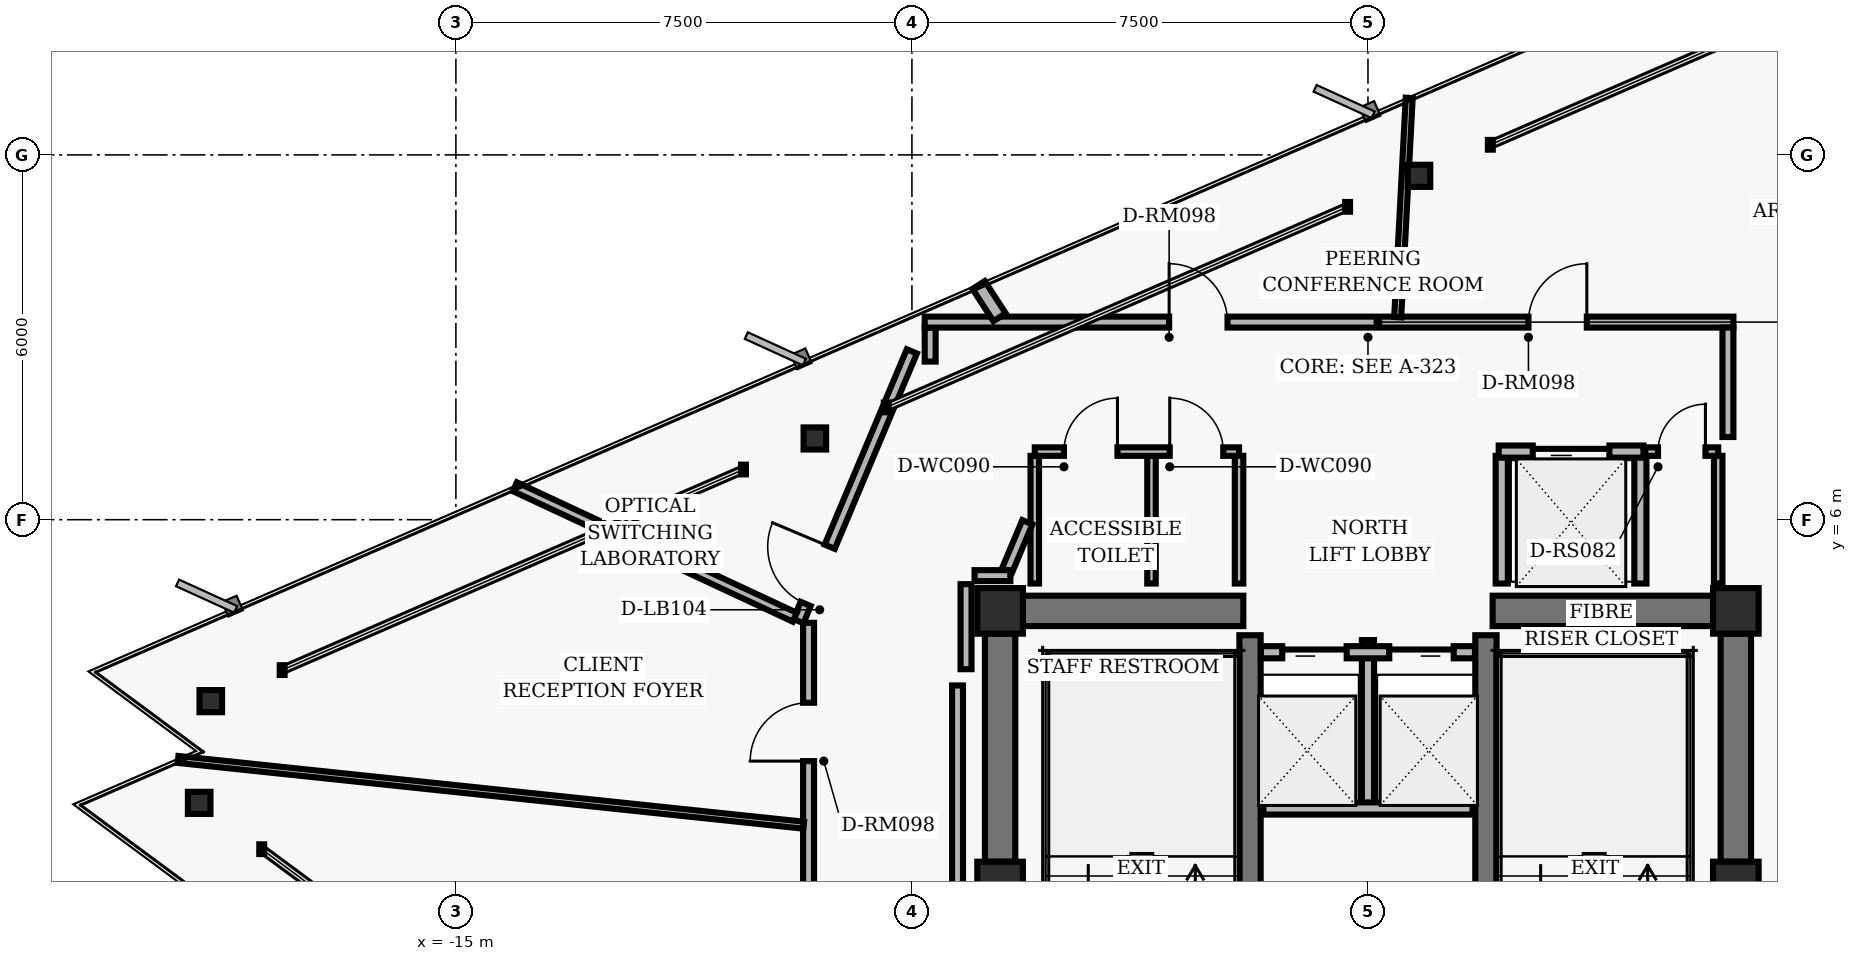
"""IFC4 building model, lengths in metres.
Left out: names, types, materials, properties, quantities, classifications, styles, units other than length and angle.
Written with IfcOpenShell. Run it as: python <this file> out.ifc"""

import sys

from ifc_helpers import new_model, si_unit, direction, frame, frame_2d, origin, origin_2d, place, context, subcontext, project, spatial, rectangle, hollow_rectangle, i_section, extrude, element, fill, save


model = new_model("IFC4")
c1 = context("Model", 3, precision=1e-05, world=origin(), true_north=direction((0.0, 1.0)))
c2 = subcontext(c1, "Body", "Model", "MODEL_VIEW")
j1 = project(units=[si_unit("LENGTHUNIT", "METRE"), si_unit("PLANEANGLEUNIT", "RADIAN")], contexts=[c1])
p1 = place(None, origin())
s1 = spatial("IfcSite", under=j1, at=p1, CompositionType="ELEMENT")
p2 = place(p1, origin())
s2 = spatial("IfcBuilding", under=s1, at=p2, CompositionType="ELEMENT")
p3 = place(p2, frame((0.0, 0.0, 227.04)))
s3 = spatial("IfcBuildingStorey", under=s2, at=p3, CompositionType="ELEMENT", Elevation=227.04)
for number, where, z_axis, x_axis in (
    (1, (-6.05, 4.5, 0.0), (0.0, 0.0, 1.0), (1.0, 0.0, 0.0)),
    (2, (6.05, 4.5, 0.0), (0.0, 0.0, 1.0), (1.0, 0.0, 0.0)),
    (3, (-6.05, 0.0, 0.0), (0.0, 0.0, 1.0), (1.0, 0.0, 0.0)),
    (4, (6.05, 0.0, 0.0), (0.0, 0.0, 1.0), (1.0, 0.0, 0.0)),
):
    element("IfcColumn", number, at=place(p3, frame(where, z_axis=z_axis, x_axis=x_axis)), inside=s3, PredefinedType="COLUMN", context=c2, shape_type="SweptSolid", body=[
        extrude(hollow_rectangle(XDim=0.75, YDim=0.75, WallThickness=0.05, InnerFilletRadius=0.02, OuterFilletRadius=0.04, at=origin_2d()), origin(), (0.0, 0.0, 1.0), 3.04),
    ])
for number, where, z_axis, x_axis in (
    (5, (-6.05, 0.375, 0.0), (0.0, 0.0, 1.0), (0.0, 1.0, 0.0)),
    (6, (6.05, 0.375, 0.0), (0.0, 0.0, 1.0), (0.0, 1.0, 0.0)),
):
    element("IfcWall", number, at=place(p3, frame(where, z_axis=z_axis, x_axis=x_axis)), inside=s3, PredefinedType="SHEAR", context=c2, shape_type="SweptSolid", body=[
        extrude(rectangle(XDim=3.75, YDim=0.5, at=frame_2d((1.875, 0.0))), origin(), (0.0, 0.0, 1.0), 2.798),
    ])
for number, where, z_axis, x_axis in (
    (7, (-1.94, -4.1, 0.0), (0.0, 0.0, 1.0), (0.0, 1.0, 0.0)),
    (8, (1.94, -4.1, 0.0), (0.0, 0.0, 1.0), (0.0, 1.0, 0.0)),
):
    element("IfcWall", number, at=place(p3, frame(where, z_axis=z_axis, x_axis=x_axis)), inside=s3, PredefinedType="SHEAR", context=c2, shape_type="SweptSolid", body=[
        extrude(rectangle(XDim=8.2, YDim=0.35, at=frame_2d((4.1, 0.0))), origin(), (0.0, 0.0, 1.0), 2.798),
    ])
for number, where, z_axis, x_axis in (
    (9, (-5.675, 4.5, 0.0), (0.0, 0.0, 1.0), (1.0, 0.0, 0.0)),
    (10, (2.05, 4.5, 0.0), (0.0, 0.0, 1.0), (1.0, 0.0, 0.0)),
):
    element("IfcWall", number, at=place(p3, frame(where, z_axis=z_axis, x_axis=x_axis)), inside=s3, PredefinedType="SHEAR", context=c2, shape_type="SweptSolid", body=[
        extrude(rectangle(XDim=3.625, YDim=0.5, at=frame_2d((1.812, 0.0))), origin(), (0.0, 0.0, 1.0), 2.798),
    ])
for number, where, z_axis, x_axis in (
    (11, (0.838, 11.656, 0.0), (0.0, 0.0, 1.0), (1.0, 0.0, 0.0)),
    (12, (-9.096, 7.336, 0.0), (0.0, 0.0, 1.0), (1.0, 0.0, 0.0)),
    (13, (-19.031, 3.016, 0.0), (0.0, 0.0, 1.0), (1.0, 0.0, 0.0)),
    (14, (-19.222, 1.342, 0.0), (0.0, 0.0, 1.0), (1.0, 0.0, 0.0)),
):
    element("IfcColumn", number, at=place(p3, frame(where, z_axis=z_axis, x_axis=x_axis)), inside=s3, PredefinedType="COLUMN", context=c2, shape_type="SweptSolid", body=[
        extrude(i_section(OverallWidth=0.371, OverallDepth=0.364, WebThickness=0.013, FlangeThickness=0.022, FilletRadius=0.015, at=origin_2d()), origin(), (0.0, 0.0, 1.0), 3.04),
    ])
p4 = place(p3, frame((0.0, 1.25, 0.0), z_axis=(0.0, 0.0, 1.0), x_axis=(0.0, 1.0, 0.0)))
e15 = element("IfcWall", 15, at=p4, inside=s3, PredefinedType="PARTITIONING", context=c2, shape_type="SweptSolid", body=[
    extrude(rectangle(XDim=2.77, YDim=0.2, at=frame_2d((1.385, 0.0))), origin(), (0.0, 0.0, 1.0), 2.773),
])
p5 = place(p3, frame((-1.72, 1.25, 0.0), z_axis=(0.0, 0.0, 1.0), x_axis=(1.0, 0.0, 0.0)))
e16 = element("IfcWall", 16, at=p5, inside=s3, PredefinedType="PARTITIONING", context=c2, shape_type="SweptSolid", body=[
    extrude(rectangle(XDim=3.44, YDim=0.2, at=frame_2d((1.72, 0.0))), origin(), (0.0, 0.0, 1.0), 2.773),
])
p6 = place(p3, frame((-1.76, 3.82, 0.0), z_axis=(0.0, 0.0, 1.0), x_axis=(1.0, 0.0, 0.0)))
e17 = element("IfcWall", 17, at=p6, inside=s3, PredefinedType="PARTITIONING", context=c2, shape_type="SweptSolid", body=[
    extrude(rectangle(XDim=3.52, YDim=0.2, at=frame_2d((1.76, 0.0))), origin(), (0.0, 0.0, 1.0), 2.773),
])
p7 = place(p6, frame((0.35, 0.0, 0.0)))
e18 = element("IfcOpeningElement", 18, at=p7, cuts=e17, PredefinedType="OPENING", context=c2, shape_type="SweptSolid", body=[
    extrude(rectangle(XDim=1.06, YDim=2.04, at=frame_2d((0.53, 1.02))), frame((0.0, 0.11, 0.0), z_axis=(0.0, -1.0, 0.0), x_axis=(1.0, 0.0, 0.0)), (0.0, 0.0, 1.0), 0.22),
])
p8 = place(p6, frame((2.11, 0.0, 0.0)))
e19 = element("IfcOpeningElement", 19, at=p8, cuts=e17, PredefinedType="OPENING", context=c2, shape_type="SweptSolid", body=[
    extrude(rectangle(XDim=1.06, YDim=2.04, at=frame_2d((0.53, 1.02))), frame((0.0, 0.11, 0.0), z_axis=(0.0, -1.0, 0.0), x_axis=(1.0, 0.0, 0.0)), (0.0, 0.0, 1.0), 0.22),
])
for number, where, z_axis, x_axis in (
    (20, (2.2, 4.95, 0.0), (0.0, 0.0, 1.0), (0.0, 1.0, 0.0)),
    (21, (4.48, 4.95, 0.0), (0.0, 0.0, 1.0), (0.0, 1.0, 0.0)),
):
    element("IfcWall", number, at=place(p3, frame(where, z_axis=z_axis, x_axis=x_axis)), inside=s3, PredefinedType="PARTITIONING", context=c2, shape_type="SweptSolid", body=[
        extrude(rectangle(XDim=2.1, YDim=0.2, at=frame_2d((1.05, 0.0))), origin(), (0.0, 0.0, 1.0), 2.773),
    ])
p9 = place(p3, frame((2.15, 7.12, 0.0), z_axis=(0.0, 0.0, 1.0), x_axis=(1.0, 0.0, 0.0)))
e22 = element("IfcWall", 22, at=p9, inside=s3, PredefinedType="PARTITIONING", context=c2, shape_type="SweptSolid", body=[
    extrude(rectangle(XDim=2.38, YDim=0.2, at=frame_2d((1.19, 0.0))), origin(), (0.0, 0.0, 1.0), 2.395),
])
p10 = place(p9, frame((0.56, 0.0, 0.0)))
e23 = element("IfcOpeningElement", 23, at=p10, cuts=e22, PredefinedType="OPENING", context=c2, shape_type="SweptSolid", body=[
    extrude(rectangle(XDim=1.26, YDim=2.06, at=frame_2d((0.63, 1.03))), frame((0.0, 0.11, 0.0), z_axis=(0.0, -1.0, 0.0), x_axis=(1.0, 0.0, 0.0)), (0.0, 0.0, 1.0), 0.22),
])
for number, where, z_axis, x_axis in (
    (24, (-5.48, 4.95, 0.0), (0.0, 0.0, 1.0), (0.0, 1.0, 0.0)),
    (25, (-3.56, 4.95, 0.0), (0.0, 0.0, 1.0), (0.0, 1.0, 0.0)),
    (26, (-2.12, 4.95, 0.0), (0.0, 0.0, 1.0), (0.0, 1.0, 0.0)),
):
    element("IfcWall", number, at=place(p3, frame(where, z_axis=z_axis, x_axis=x_axis)), inside=s3, PredefinedType="PARTITIONING", context=c2, shape_type="SweptSolid", body=[
        extrude(rectangle(XDim=2.1, YDim=0.14, at=frame_2d((1.05, 0.0))), origin(), (0.0, 0.0, 1.0), 2.773),
    ])
p11 = place(p3, frame((-5.48, 7.12, 0.0), z_axis=(0.0, 0.0, 1.0), x_axis=(1.0, 0.0, 0.0)))
e27 = element("IfcWall", 27, at=p11, inside=s3, PredefinedType="PARTITIONING", context=c2, shape_type="SweptSolid", body=[
    extrude(rectangle(XDim=3.36, YDim=0.14, at=frame_2d((1.68, 0.0))), origin(), (0.0, 0.0, 1.0), 2.395),
])
p12 = place(p11, frame((0.48, 0.0, 0.0)))
e28 = element("IfcOpeningElement", 28, at=p12, cuts=e27, PredefinedType="OPENING", context=c2, shape_type="SweptSolid", body=[
    extrude(rectangle(XDim=0.88, YDim=2.02, at=frame_2d((0.44, 1.01))), frame((0.0, 0.08, 0.0), z_axis=(0.0, -1.0, 0.0), x_axis=(1.0, 0.0, 0.0)), (0.0, 0.0, 1.0), 0.16),
])
p13 = place(p11, frame((2.22, 0.0, 0.0)))
e29 = element("IfcOpeningElement", 29, at=p13, cuts=e27, PredefinedType="OPENING", context=c2, shape_type="SweptSolid", body=[
    extrude(rectangle(XDim=0.88, YDim=2.02, at=frame_2d((0.44, 1.01))), frame((0.0, 0.08, 0.0), z_axis=(0.0, -1.0, 0.0), x_axis=(1.0, 0.0, 0.0)), (0.0, 0.0, 1.0), 0.16),
])
p14 = place(p3, frame((5.76, 4.95, 0.0), z_axis=(0.0, 0.0, 1.0), x_axis=(0.0, 1.0, 0.0)))
e30 = element("IfcWall", 30, at=p14, inside=s3, PredefinedType="PARTITIONING", context=c2, shape_type="SweptSolid", body=[
    extrude(rectangle(XDim=2.1, YDim=0.14, at=frame_2d((1.05, 0.0))), origin(), (0.0, 0.0, 1.0), 2.773),
])
p15 = place(p3, frame((4.56, 7.12, 0.0), z_axis=(0.0, 0.0, 1.0), x_axis=(1.0, 0.0, 0.0)))
e31 = element("IfcWall", 31, at=p15, inside=s3, PredefinedType="PARTITIONING", context=c2, shape_type="SweptSolid", body=[
    extrude(rectangle(XDim=1.2, YDim=0.14, at=frame_2d((0.6, 0.0))), origin(), (0.0, 0.0, 1.0), 2.773),
])
p16 = place(p15, frame((0.21, 0.0, 0.0)))
e32 = element("IfcOpeningElement", 32, at=p16, cuts=e31, PredefinedType="OPENING", context=c2, shape_type="SweptSolid", body=[
    extrude(rectangle(XDim=0.78, YDim=2.01, at=frame_2d((0.39, 1.005))), frame((0.0, 0.08, 0.0), z_axis=(0.0, -1.0, 0.0), x_axis=(1.0, 0.0, 0.0)), (0.0, 0.0, 1.0), 0.16),
])
p17 = place(p3, frame((-9.2, -4.303, 0.0), z_axis=(0.0, 0.0, 1.0), x_axis=(0.0, 1.0, 0.0)))
e33 = element("IfcWall", 33, at=p17, inside=s3, PredefinedType="PARTITIONING", context=c2, shape_type="SweptSolid", body=[
    extrude(rectangle(XDim=8.607, YDim=0.18, at=frame_2d((4.303, 0.0))), origin(), (0.0, 0.0, 1.0), 2.773),
])
p18 = place(p17, frame((2.289, 0.0, 0.0)))
e34 = element("IfcOpeningElement", 34, at=p18, cuts=e33, PredefinedType="OPENING", context=c2, shape_type="SweptSolid", body=[
    extrude(rectangle(XDim=0.96, YDim=2.02, at=frame_2d((0.48, 1.01))), frame((0.0, 0.1, 0.0), z_axis=(0.0, -1.0, 0.0), x_axis=(1.0, 0.0, 0.0)), (0.0, 0.0, 1.0), 0.2),
])
p19 = place(p17, frame((6.333, 0.0, 0.0)))
e35 = element("IfcOpeningElement", 35, at=p19, cuts=e33, PredefinedType="OPENING", context=c2, shape_type="SweptSolid", body=[
    extrude(rectangle(XDim=0.96, YDim=2.02, at=frame_2d((0.48, 1.01))), frame((0.0, 0.1, 0.0), z_axis=(0.0, -1.0, 0.0), x_axis=(1.0, 0.0, 0.0)), (0.0, 0.0, 1.0), 0.2),
])
p20 = place(p3, frame((-9.367, 4.332, 0.0), z_axis=(0.0, 0.0, 1.0), x_axis=(0.387573945081, 0.921838617706, 0.0)))
e36 = element("IfcWall", 36, at=p20, inside=s3, PredefinedType="PARTITIONING", context=c2, shape_type="SweptSolid", body=[
    extrude(rectangle(XDim=4.813, YDim=0.18, at=frame_2d((2.407, 0.0))), origin(), (0.0, 0.0, 1.0), 2.773),
])
p21 = place(p20, frame((0.307, 0.0, 0.0)))
e37 = element("IfcOpeningElement", 37, at=p21, cuts=e36, PredefinedType="OPENING", context=c2, shape_type="SweptSolid", body=[
    extrude(rectangle(XDim=1.02, YDim=2.02, at=frame_2d((0.51, 1.01))), frame((0.0, 0.1, 0.0), z_axis=(0.0, -1.0, 0.0), x_axis=(1.0, 0.0, 0.0)), (0.0, 0.0, 1.0), 0.2),
])
p22 = place(p3, frame((-7.2, 8.601, 0.0), z_axis=(0.0, 0.0, 1.0), x_axis=(0.0, 1.0, 0.0)))
e38 = element("IfcWall", 38, at=p22, inside=s3, PredefinedType="PARTITIONING", context=c2, shape_type="SweptSolid", body=[
    extrude(rectangle(XDim=0.559, YDim=0.18, at=frame_2d((0.28, 0.0))), origin(), (0.0, 0.0, 1.0), 2.773),
])
p23 = place(p3, frame((-7.29, 9.25, 0.0), z_axis=(0.0, 0.0, 1.0), x_axis=(1.0, 0.0, 0.0)))
e39 = element("IfcWall", 39, at=p23, inside=s3, PredefinedType="PARTITIONING", context=c2, shape_type="SweptSolid", body=[
    extrude(rectangle(XDim=13.3, YDim=0.18, at=frame_2d((6.65, 0.0))), origin(), (0.0, 0.0, 1.0), 2.395),
])
p24 = place(p23, frame((9.929, 0.0, 0.0)))
e40 = element("IfcOpeningElement", 40, at=p24, cuts=e39, PredefinedType="OPENING", context=c2, shape_type="SweptSolid", body=[
    extrude(rectangle(XDim=0.96, YDim=2.02, at=frame_2d((0.48, 1.01))), frame((0.0, 0.1, 0.0), z_axis=(0.0, -1.0, 0.0), x_axis=(1.0, 0.0, 0.0)), (0.0, 0.0, 1.0), 0.2),
])
p25 = place(p23, frame((4.02, 0.0, 0.0)))
e41 = element("IfcOpeningElement", 41, at=p25, cuts=e39, PredefinedType="OPENING", context=c2, shape_type="SweptSolid", body=[
    extrude(rectangle(XDim=0.96, YDim=2.02, at=frame_2d((0.48, 1.01))), frame((0.0, 0.1, 0.0), z_axis=(0.0, -1.0, 0.0), x_axis=(1.0, 0.0, 0.0)), (0.0, 0.0, 1.0), 0.2),
])
p26 = place(p3, frame((5.92, 9.16, 0.0), z_axis=(0.0, 0.0, 1.0), x_axis=(0.0, -1.0, 0.0)))
e42 = element("IfcWall", 42, at=p26, inside=s3, PredefinedType="PARTITIONING", context=c2, shape_type="SweptSolid", body=[
    extrude(rectangle(XDim=1.8, YDim=0.18, at=frame_2d((0.9, 0.0))), origin(), (0.0, 0.0, 1.0), 2.773),
])
p27 = place(p3, frame((-5.602, 5.958, 0.0), z_axis=(0.0, 0.0, 1.0), x_axis=(-0.387588639363, -0.921832439566, 0.0)))
e43 = element("IfcWall", 43, at=p27, inside=s3, PredefinedType="PARTITIONING", context=c2, shape_type="SweptSolid", body=[
    extrude(rectangle(XDim=0.862, YDim=0.18, at=frame_2d((0.431, 0.0))), origin(), (0.0, 0.0, 1.0), 2.773),
])
p28 = place(p3, frame((-5.881, 5.08, 0.0), z_axis=(0.0, 0.0, 1.0), x_axis=(-1.0, 0.0, 0.0)))
e44 = element("IfcWall", 44, at=p28, inside=s3, PredefinedType="PARTITIONING", context=c2, shape_type="SweptSolid", body=[
    extrude(rectangle(XDim=0.589, YDim=0.18, at=frame_2d((0.294, 0.0))), origin(), (0.0, 0.0, 1.0), 2.773),
])
p29 = place(p3, frame((-6.61, 4.94, 0.0), z_axis=(0.0, 0.0, 1.0), x_axis=(0.0, -1.0, 0.0)))
e45 = element("IfcWall", 45, at=p29, inside=s3, PredefinedType="PARTITIONING", context=c2, shape_type="SweptSolid", body=[
    extrude(rectangle(XDim=1.399, YDim=0.18, at=frame_2d((0.699, 0.0))), origin(), (0.0, 0.0, 1.0), 2.773),
])
p30 = place(p3, frame((-6.75, 3.273, 0.0), z_axis=(0.0, 0.0, 1.0), x_axis=(0.0, -1.0, 0.0)))
e46 = element("IfcWall", 46, at=p30, inside=s3, PredefinedType="PARTITIONING", context=c2, shape_type="SweptSolid", body=[
    extrude(rectangle(XDim=6.547, YDim=0.18, at=frame_2d((3.273, 0.0))), origin(), (0.0, 0.0, 1.0), 2.773),
])
p31 = place(p3, frame((0.489, 9.33, 0.0), z_axis=(0.0, 0.0, 1.0), x_axis=(0.05229993373, 0.998631421963, 0.0)))
e47 = element("IfcWall", 47, at=p31, inside=s3, PredefinedType="MOVABLE", context=c2, shape_type="SweptSolid", body=[
    extrude(rectangle(XDim=3.613, YDim=0.115, at=frame_2d((1.807, 0.0))), origin(), (0.0, 0.0, 1.0), 2.773),
])
p32 = place(p3, frame((-6.059, 9.33, 0.0), z_axis=(0.0, 0.0, 1.0), x_axis=(-0.54466198204, 0.838655665527, 0.0)))
e48 = element("IfcWall", 48, at=p32, inside=s3, PredefinedType="PARTITIONING", context=c2, shape_type="SweptSolid", body=[
    extrude(rectangle(XDim=0.631, YDim=0.24, at=frame_2d((0.315, 0.0))), origin(), (0.0, 0.0, 1.0), 2.773),
])
p33 = place(p3, frame((-9.427, 4.396, 0.0), z_axis=(0.0, 0.0, 1.0), x_axis=(-0.906319380456, 0.422593398682, 0.0)))
e49 = element("IfcWall", 49, at=p33, inside=s3, PredefinedType="PARTITIONING", context=c2, shape_type="SweptSolid", body=[
    extrude(rectangle(XDim=5.08, YDim=0.16, at=frame_2d((2.54, 0.0))), origin(), (0.0, 0.0, 1.0), 2.773),
])
p34 = place(p3, frame((-9.28, 0.975, 0.0), z_axis=(0.0, 0.0, 1.0), x_axis=(-0.994520958229, 0.104537379166, 0.0)))
e50 = element("IfcWall", 50, at=p34, inside=s3, PredefinedType="MOVABLE", context=c2, shape_type="SweptSolid", body=[
    extrude(rectangle(XDim=10.346, YDim=0.115, at=frame_2d((5.173, 0.0))), origin(), (0.0, 0.0, 1.0), 2.773),
])
p35 = place(p7, origin())
e51 = element("IfcDoor", 51, at=p35, inside=s3, OperationType="SLIDING_TO_LEFT", PredefinedType="DOOR", context=c2, shape_type="SweptSolid", body=[
    extrude(rectangle(XDim=1.06, YDim=2.04, at=frame_2d((0.53, 1.02))), frame((0.0, 0.025, 0.0), z_axis=(0.0, -1.0, 0.0), x_axis=(1.0, 0.0, 0.0)), (0.0, 0.0, 1.0), 0.05),
])
fill(e18, e51)
p36 = place(p8, origin())
e52 = element("IfcDoor", 52, at=p36, inside=s3, OperationType="SLIDING_TO_RIGHT", PredefinedType="DOOR", context=c2, shape_type="SweptSolid", body=[
    extrude(rectangle(XDim=1.06, YDim=2.04, at=frame_2d((0.53, 1.02))), frame((0.0, 0.025, 0.0), z_axis=(0.0, -1.0, 0.0), x_axis=(1.0, 0.0, 0.0)), (0.0, 0.0, 1.0), 0.05),
])
fill(e19, e52)
p37 = place(p10, origin())
e53 = element("IfcDoor", 53, at=p37, inside=s3, OperationType="SLIDING_TO_LEFT", PredefinedType="DOOR", context=c2, shape_type="SweptSolid", body=[
    extrude(rectangle(XDim=1.26, YDim=2.06, at=frame_2d((0.63, 1.03))), frame((0.0, 0.025, 0.0), z_axis=(0.0, -1.0, 0.0), x_axis=(1.0, 0.0, 0.0)), (0.0, 0.0, 1.0), 0.05),
])
fill(e23, e53)
p38 = place(p12, origin())
e54 = element("IfcDoor", 54, at=p38, inside=s3, OperationType="SINGLE_SWING_RIGHT", PredefinedType="DOOR", context=c2, shape_type="SweptSolid", body=[
    extrude(rectangle(XDim=0.88, YDim=2.02, at=frame_2d((0.44, 1.01))), frame((0.0, 0.025, 0.0), z_axis=(0.0, -1.0, 0.0), x_axis=(1.0, 0.0, 0.0)), (0.0, 0.0, 1.0), 0.05),
])
fill(e28, e54)
p39 = place(p13, origin())
e55 = element("IfcDoor", 55, at=p39, inside=s3, OperationType="SINGLE_SWING_LEFT", PredefinedType="DOOR", context=c2, shape_type="SweptSolid", body=[
    extrude(rectangle(XDim=0.88, YDim=2.02, at=frame_2d((0.44, 1.01))), frame((0.0, 0.025, 0.0), z_axis=(0.0, -1.0, 0.0), x_axis=(1.0, 0.0, 0.0)), (0.0, 0.0, 1.0), 0.05),
])
fill(e29, e55)
p40 = place(p16, origin())
e56 = element("IfcDoor", 56, at=p40, inside=s3, OperationType="SINGLE_SWING_RIGHT", PredefinedType="DOOR", context=c2, shape_type="SweptSolid", body=[
    extrude(rectangle(XDim=0.78, YDim=2.01, at=frame_2d((0.39, 1.005))), frame((0.0, 0.025, 0.0), z_axis=(0.0, -1.0, 0.0), x_axis=(1.0, 0.0, 0.0)), (0.0, 0.0, 1.0), 0.05),
])
fill(e32, e56)
p41 = place(p24, origin())
e57 = element("IfcDoor", 57, at=p41, inside=s3, OperationType="SINGLE_SWING_RIGHT", PredefinedType="DOOR", context=c2, shape_type="SweptSolid", body=[
    extrude(rectangle(XDim=0.96, YDim=2.02, at=frame_2d((0.48, 1.01))), frame((0.0, 0.025, 0.0), z_axis=(0.0, -1.0, 0.0), x_axis=(1.0, 0.0, 0.0)), (0.0, 0.0, 1.0), 0.05),
])
fill(e40, e57)
p42 = place(p25, origin())
e58 = element("IfcDoor", 58, at=p42, inside=s3, OperationType="SINGLE_SWING_LEFT", PredefinedType="DOOR", context=c2, shape_type="SweptSolid", body=[
    extrude(rectangle(XDim=0.96, YDim=2.02, at=frame_2d((0.48, 1.01))), frame((0.0, 0.025, 0.0), z_axis=(0.0, -1.0, 0.0), x_axis=(1.0, 0.0, 0.0)), (0.0, 0.0, 1.0), 0.05),
])
fill(e41, e58)
p43 = place(p21, origin())
e59 = element("IfcDoor", 59, at=p43, inside=s3, OperationType="SINGLE_SWING_RIGHT", PredefinedType="DOOR", context=c2, shape_type="SweptSolid", body=[
    extrude(rectangle(XDim=1.02, YDim=2.02, at=frame_2d((0.51, 1.01))), frame((0.0, 0.025, 0.0), z_axis=(0.0, -1.0, 0.0), x_axis=(1.0, 0.0, 0.0)), (0.0, 0.0, 1.0), 0.05),
])
fill(e37, e59)
p44 = place(p19, origin())
e60 = element("IfcDoor", 60, at=p44, inside=s3, OperationType="SINGLE_SWING_LEFT", PredefinedType="DOOR", context=c2, shape_type="SweptSolid", body=[
    extrude(rectangle(XDim=0.96, YDim=2.02, at=frame_2d((0.48, 1.01))), frame((0.0, 0.025, 0.0), z_axis=(0.0, -1.0, 0.0), x_axis=(1.0, 0.0, 0.0)), (0.0, 0.0, 1.0), 0.05),
])
fill(e35, e60)
save(model, sys.argv[1])
